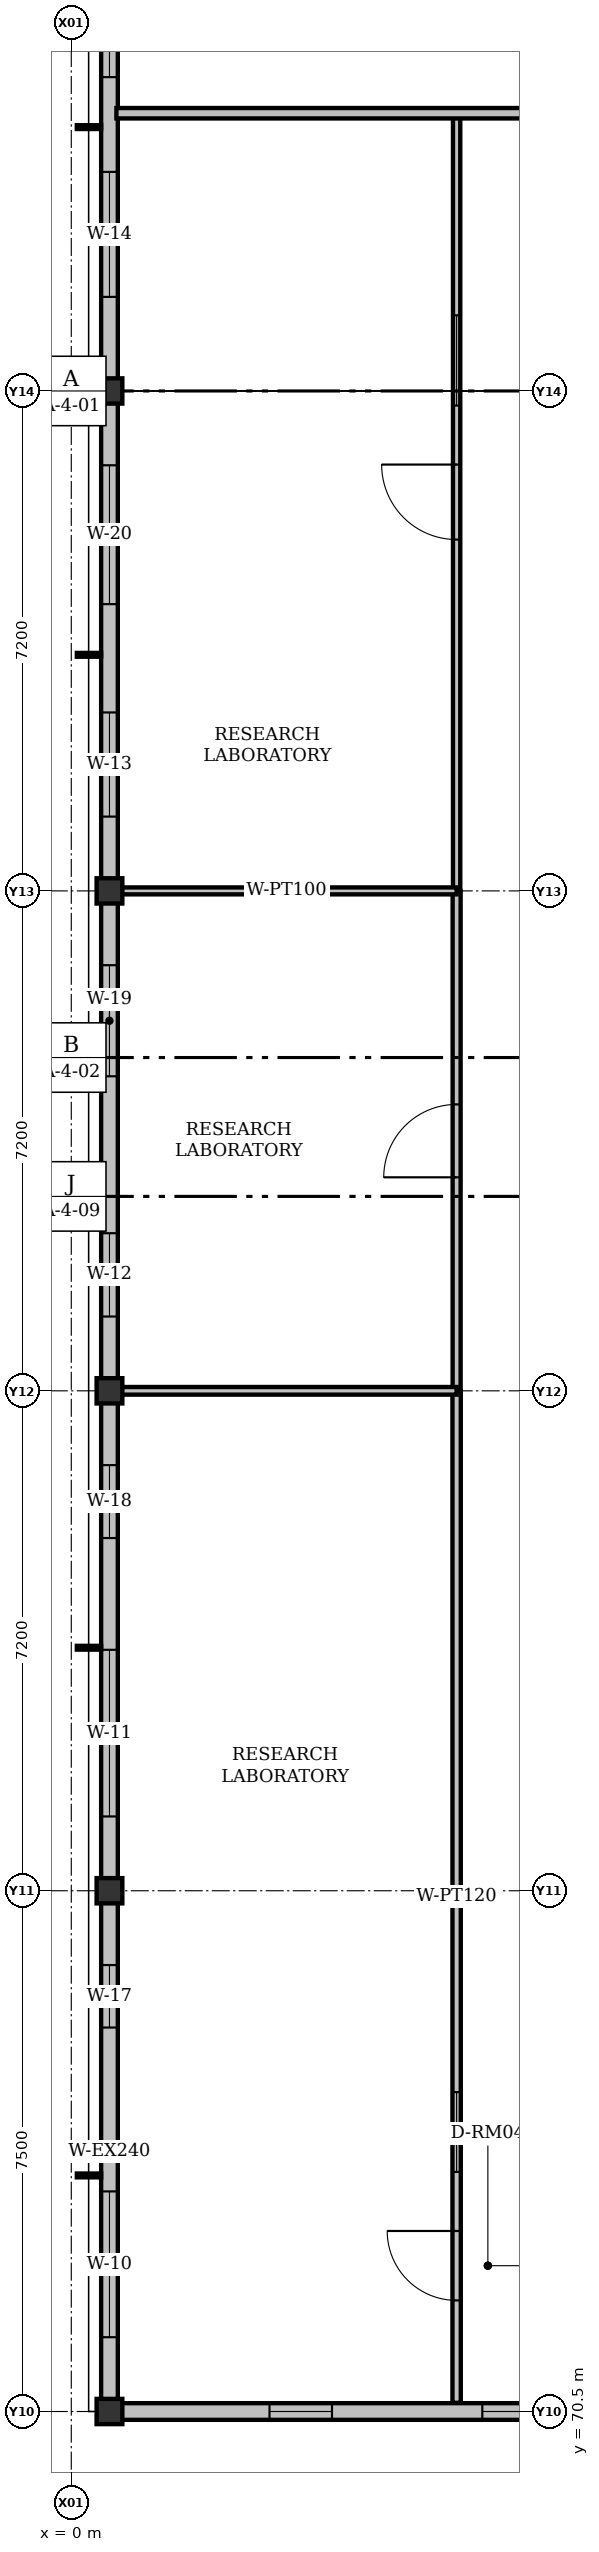
"""IFC4 building model, lengths in metres.
Left out: names, types, materials, properties, quantities, classifications, styles, units other than length and angle.
Written with IfcOpenShell. Run it as: python <this file> out.ifc"""

import sys

from ifc_helpers import new_model, si_unit, direction, frame, frame_2d, origin, origin_2d, place, context, subcontext, project, spatial, rectangle, i_section, extrude, element, fill, save


model = new_model("IFC4")
c1 = context("Model", 3, precision=1e-05, world=origin(), true_north=direction((0.0, 1.0)))
c2 = subcontext(c1, "Body", "Model", "MODEL_VIEW")
j1 = project(units=[si_unit("LENGTHUNIT", "METRE"), si_unit("PLANEANGLEUNIT", "RADIAN")], contexts=[c1])
p1 = place(None, origin())
s1 = spatial("IfcSite", under=j1, at=p1, CompositionType="ELEMENT")
p2 = place(p1, origin())
s2 = spatial("IfcBuilding", under=s1, at=p2, CompositionType="ELEMENT")
p3 = place(p2, frame((0.0, 0.0, 39.3)))
s3 = spatial("IfcBuildingStorey", under=s2, at=p3, CompositionType="ELEMENT", Elevation=39.3)
for number, where, z_axis, x_axis in (
    (1, (0.55, 70.5, 0.0), (0.0, 0.0, 1.0), (1.0, 0.0, 0.0)),
    (2, (0.55, 78.0, 0.0), (0.0, 0.0, 1.0), (1.0, 0.0, 0.0)),
    (3, (0.55, 85.2, 0.0), (0.0, 0.0, 1.0), (1.0, 0.0, 0.0)),
    (4, (0.55, 92.4, 0.0), (0.0, 0.0, 1.0), (1.0, 0.0, 0.0)),
    (5, (0.55, 99.6, 0.0), (0.0, 0.0, 1.0), (1.0, 0.0, 0.0)),
):
    element("IfcColumn", number, at=place(p3, frame(where, z_axis=z_axis, x_axis=x_axis)), inside=s3, PredefinedType="COLUMN", context=c2, shape_type="SweptSolid", body=[
        extrude(i_section(OverallWidth=0.371, OverallDepth=0.364, WebThickness=0.013, FlangeThickness=0.022, FilletRadius=0.015, at=origin_2d()), origin(), (0.0, 0.0, 1.0), 4.2),
    ])
p4 = place(p3, frame((0.55, 70.5, 0.0), z_axis=(0.0, 0.0, 1.0), x_axis=(0.0, 1.0, 0.0)))
e6 = element("IfcWall", 6, at=p4, inside=s3, PredefinedType="SOLIDWALL", context=c2, shape_type="SweptSolid", body=[
    extrude(rectangle(XDim=7.5, YDim=0.24, at=frame_2d((3.75, 0.0))), origin(), (0.0, 0.0, 1.0), 3.577),
])
p5 = place(p4, frame((1.07, 0.0, 0.92)))
e7 = element("IfcOpeningElement", 7, at=p5, cuts=e6, PredefinedType="OPENING", context=c2, shape_type="SweptSolid", body=[
    extrude(rectangle(XDim=2.1, YDim=1.55, at=frame_2d((1.05, 0.775))), frame((0.0, 0.12, 0.0), z_axis=(0.0, -1.0, 0.0), x_axis=(1.0, 0.0, 0.0)), (0.0, 0.0, 1.0), 0.24),
])
p6 = place(p4, frame((5.53, 0.0, 0.92)))
e8 = element("IfcOpeningElement", 8, at=p6, cuts=e6, PredefinedType="OPENING", context=c2, shape_type="SweptSolid", body=[
    extrude(rectangle(XDim=0.9, YDim=1.3, at=frame_2d((0.45, 0.65))), frame((0.0, 0.12, 0.0), z_axis=(0.0, -1.0, 0.0), x_axis=(1.0, 0.0, 0.0)), (0.0, 0.0, 1.0), 0.24),
])
p7 = place(p3, frame((0.55, 78.0, 0.0), z_axis=(0.0, 0.0, 1.0), x_axis=(0.0, 1.0, 0.0)))
e9 = element("IfcWall", 9, at=p7, inside=s3, PredefinedType="SOLIDWALL", context=c2, shape_type="SweptSolid", body=[
    extrude(rectangle(XDim=7.2, YDim=0.24, at=frame_2d((3.6, 0.0))), origin(), (0.0, 0.0, 1.0), 3.577),
])
p8 = place(p7, frame((1.07, 0.0, 0.92)))
e10 = element("IfcOpeningElement", 10, at=p8, cuts=e9, PredefinedType="OPENING", context=c2, shape_type="SweptSolid", body=[
    extrude(rectangle(XDim=2.4, YDim=1.55, at=frame_2d((1.2, 0.775))), frame((0.0, 0.12, 0.0), z_axis=(0.0, -1.0, 0.0), x_axis=(1.0, 0.0, 0.0)), (0.0, 0.0, 1.0), 0.24),
])
p9 = place(p7, frame((5.08, 0.0, 0.92)))
e11 = element("IfcOpeningElement", 11, at=p9, cuts=e9, PredefinedType="OPENING", context=c2, shape_type="SweptSolid", body=[
    extrude(rectangle(XDim=1.05, YDim=1.3, at=frame_2d((0.525, 0.65))), frame((0.0, 0.12, 0.0), z_axis=(0.0, -1.0, 0.0), x_axis=(1.0, 0.0, 0.0)), (0.0, 0.0, 1.0), 0.24),
])
p10 = place(p3, frame((0.55, 85.2, 0.0), z_axis=(0.0, 0.0, 1.0), x_axis=(0.0, 1.0, 0.0)))
e12 = element("IfcWall", 12, at=p10, inside=s3, PredefinedType="SOLIDWALL", context=c2, shape_type="SweptSolid", body=[
    extrude(rectangle(XDim=7.2, YDim=0.24, at=frame_2d((3.6, 0.0))), origin(), (0.0, 0.0, 1.0), 3.577),
])
p11 = place(p10, frame((1.07, 0.0, 0.92)))
e13 = element("IfcOpeningElement", 13, at=p11, cuts=e12, PredefinedType="OPENING", context=c2, shape_type="SweptSolid", body=[
    extrude(rectangle(XDim=1.2, YDim=1.7, at=frame_2d((0.6, 0.85))), frame((0.0, 0.12, 0.0), z_axis=(0.0, -1.0, 0.0), x_axis=(1.0, 0.0, 0.0)), (0.0, 0.0, 1.0), 0.24),
])
p12 = place(p10, frame((4.53, 0.0, 0.92)))
e14 = element("IfcOpeningElement", 14, at=p12, cuts=e12, PredefinedType="OPENING", context=c2, shape_type="SweptSolid", body=[
    extrude(rectangle(XDim=1.6, YDim=1.35, at=frame_2d((0.8, 0.675))), frame((0.0, 0.12, 0.0), z_axis=(0.0, -1.0, 0.0), x_axis=(1.0, 0.0, 0.0)), (0.0, 0.0, 1.0), 0.24),
])
p13 = place(p3, frame((0.55, 92.4, 0.0), z_axis=(0.0, 0.0, 1.0), x_axis=(0.0, 1.0, 0.0)))
e15 = element("IfcWall", 15, at=p13, inside=s3, PredefinedType="SOLIDWALL", context=c2, shape_type="SweptSolid", body=[
    extrude(rectangle(XDim=7.2, YDim=0.24, at=frame_2d((3.6, 0.0))), origin(), (0.0, 0.0, 1.0), 3.577),
])
p14 = place(p13, frame((1.07, 0.0, 0.92)))
e16 = element("IfcOpeningElement", 16, at=p14, cuts=e15, PredefinedType="OPENING", context=c2, shape_type="SweptSolid", body=[
    extrude(rectangle(XDim=1.5, YDim=1.7, at=frame_2d((0.75, 0.85))), frame((0.0, 0.12, 0.0), z_axis=(0.0, -1.0, 0.0), x_axis=(1.0, 0.0, 0.0)), (0.0, 0.0, 1.0), 0.24),
])
p15 = place(p13, frame((4.13, 0.0, 0.92)))
e17 = element("IfcOpeningElement", 17, at=p15, cuts=e15, PredefinedType="OPENING", context=c2, shape_type="SweptSolid", body=[
    extrude(rectangle(XDim=2.0, YDim=1.35, at=frame_2d((1.0, 0.675))), frame((0.0, 0.12, 0.0), z_axis=(0.0, -1.0, 0.0), x_axis=(1.0, 0.0, 0.0)), (0.0, 0.0, 1.0), 0.24),
])
p16 = place(p3, frame((0.55, 99.6, 0.0), z_axis=(0.0, 0.0, 1.0), x_axis=(0.0, 1.0, 0.0)))
e18 = element("IfcWall", 18, at=p16, inside=s3, PredefinedType="SOLIDWALL", context=c2, shape_type="SweptSolid", body=[
    extrude(rectangle(XDim=7.2, YDim=0.24, at=frame_2d((3.6, 0.0))), origin(), (0.0, 0.0, 1.0), 3.577),
])
p17 = place(p16, frame((1.355, 0.0, 0.92)))
e19 = element("IfcOpeningElement", 19, at=p17, cuts=e18, PredefinedType="OPENING", context=c2, shape_type="SweptSolid", body=[
    extrude(rectangle(XDim=1.8, YDim=1.7, at=frame_2d((0.9, 0.85))), frame((0.0, 0.12, 0.0), z_axis=(0.0, -1.0, 0.0), x_axis=(1.0, 0.0, 0.0)), (0.0, 0.0, 1.0), 0.24),
])
p18 = place(p16, frame((4.52, 0.0, 0.92)))
e20 = element("IfcOpeningElement", 20, at=p18, cuts=e18, PredefinedType="OPENING", context=c2, shape_type="SweptSolid", body=[
    extrude(rectangle(XDim=1.65, YDim=1.4, at=frame_2d((0.825, 0.7))), frame((0.0, 0.12, 0.0), z_axis=(0.0, -1.0, 0.0), x_axis=(1.0, 0.0, 0.0)), (0.0, 0.0, 1.0), 0.24),
])
p19 = place(p3, frame((7.85, 70.5, 0.0), z_axis=(0.0, 0.0, 1.0), x_axis=(-1.0, 0.0, 0.0)))
e21 = element("IfcWall", 21, at=p19, inside=s3, PredefinedType="SOLIDWALL", context=c2, shape_type="SweptSolid", body=[
    extrude(rectangle(XDim=7.3, YDim=0.24, at=frame_2d((3.65, 0.0))), origin(), (0.0, 0.0, 1.0), 3.577),
])
p20 = place(p19, frame((0.88, 0.0, 0.92)))
e22 = element("IfcOpeningElement", 22, at=p20, cuts=e21, PredefinedType="OPENING", context=c2, shape_type="SweptSolid", body=[
    extrude(rectangle(XDim=1.05, YDim=1.3, at=frame_2d((0.525, 0.65))), frame((0.0, 0.12, 0.0), z_axis=(0.0, -1.0, 0.0), x_axis=(1.0, 0.0, 0.0)), (0.0, 0.0, 1.0), 0.24),
])
p21 = place(p19, frame((4.095, 0.0, 0.92)))
e23 = element("IfcOpeningElement", 23, at=p21, cuts=e21, PredefinedType="OPENING", context=c2, shape_type="SweptSolid", body=[
    extrude(rectangle(XDim=0.9, YDim=1.3, at=frame_2d((0.45, 0.65))), frame((0.0, 0.12, 0.0), z_axis=(0.0, -1.0, 0.0), x_axis=(1.0, 0.0, 0.0)), (0.0, 0.0, 1.0), 0.24),
])
p22 = place(p3, frame((5.55, 70.625, 0.0), z_axis=(0.0, 0.0, 1.0), x_axis=(0.0, 1.0, 0.0)))
e24 = element("IfcWall", 24, at=p22, inside=s3, PredefinedType="PARTITIONING", context=c2, shape_type="SweptSolid", body=[
    extrude(rectangle(XDim=14.575, YDim=0.12, at=frame_2d((7.288, 0.0))), origin(), (0.0, 0.0, 1.0), 3.451),
])
p23 = place(p22, frame((1.475, 0.0, 0.0)))
e25 = element("IfcOpeningElement", 25, at=p23, cuts=e24, PredefinedType="OPENING", context=c2, shape_type="SweptSolid", body=[
    extrude(rectangle(XDim=1.0, YDim=2.1, at=frame_2d((0.5, 1.05))), frame((0.0, 0.06, 0.0), z_axis=(0.0, -1.0, 0.0), x_axis=(1.0, 0.0, 0.0)), (0.0, 0.0, 1.0), 0.12),
])
p24 = place(p22, frame((3.325, 0.0, 0.92)))
e26 = element("IfcOpeningElement", 26, at=p24, cuts=e24, PredefinedType="OPENING", context=c2, shape_type="SweptSolid", body=[
    extrude(rectangle(XDim=1.15, YDim=1.3, at=frame_2d((0.575, 0.65))), frame((0.0, 0.06, 0.0), z_axis=(0.0, -1.0, 0.0), x_axis=(1.0, 0.0, 0.0)), (0.0, 0.0, 1.0), 0.12),
])
p25 = place(p3, frame((5.55, 85.2, 0.0), z_axis=(0.0, 0.0, 1.0), x_axis=(0.0, 1.0, 0.0)))
e27 = element("IfcWall", 27, at=p25, inside=s3, PredefinedType="PARTITIONING", context=c2, shape_type="SweptSolid", body=[
    extrude(rectangle(XDim=7.2, YDim=0.115, at=frame_2d((3.6, 0.0))), origin(), (0.0, 0.0, 1.0), 3.451),
])
p26 = place(p25, frame((3.075, 0.0, 0.0)))
e28 = element("IfcOpeningElement", 28, at=p26, cuts=e27, PredefinedType="OPENING", context=c2, shape_type="SweptSolid", body=[
    extrude(rectangle(XDim=1.05, YDim=2.1, at=frame_2d((0.525, 1.05))), frame((0.0, 0.058, 0.0), z_axis=(0.0, -1.0, 0.0), x_axis=(1.0, 0.0, 0.0)), (0.0, 0.0, 1.0), 0.115),
])
p27 = place(p3, frame((0.65, 85.2, 0.0), z_axis=(0.0, 0.0, 1.0), x_axis=(1.0, 0.0, 0.0)))
e29 = element("IfcWall", 29, at=p27, inside=s3, PredefinedType="PARTITIONING", context=c2, shape_type="SweptSolid", body=[
    extrude(rectangle(XDim=4.9, YDim=0.11, at=frame_2d((2.45, 0.0))), origin(), (0.0, 0.0, 1.0), 3.451),
])
p28 = place(p3, frame((5.55, 92.4, 0.0), z_axis=(0.0, 0.0, 1.0), x_axis=(0.0, 1.0, 0.0)))
e30 = element("IfcWall", 30, at=p28, inside=s3, PredefinedType="PARTITIONING", context=c2, shape_type="SweptSolid", body=[
    extrude(rectangle(XDim=11.2, YDim=0.105, at=frame_2d((5.6, 0.0))), origin(), (0.0, 0.0, 1.0), 3.451),
])
p29 = place(p28, frame((5.06, 0.0, 0.0)))
e31 = element("IfcOpeningElement", 31, at=p29, cuts=e30, PredefinedType="OPENING", context=c2, shape_type="SweptSolid", body=[
    extrude(rectangle(XDim=1.08, YDim=2.1, at=frame_2d((0.54, 1.05))), frame((0.0, 0.052, 0.0), z_axis=(0.0, -1.0, 0.0), x_axis=(1.0, 0.0, 0.0)), (0.0, 0.0, 1.0), 0.105),
])
p30 = place(p28, frame((6.99, 0.0, 0.92)))
e32 = element("IfcOpeningElement", 32, at=p30, cuts=e30, PredefinedType="OPENING", context=c2, shape_type="SweptSolid", body=[
    extrude(rectangle(XDim=1.3, YDim=1.3, at=frame_2d((0.65, 0.65))), frame((0.0, 0.052, 0.0), z_axis=(0.0, -1.0, 0.0), x_axis=(1.0, 0.0, 0.0)), (0.0, 0.0, 1.0), 0.105),
])
p31 = place(p3, frame((0.65, 92.4, 0.0), z_axis=(0.0, 0.0, 1.0), x_axis=(1.0, 0.0, 0.0)))
e33 = element("IfcWall", 33, at=p31, inside=s3, PredefinedType="PARTITIONING", context=c2, shape_type="SweptSolid", body=[
    extrude(rectangle(XDim=4.9, YDim=0.1, at=frame_2d((2.45, 0.0))), origin(), (0.0, 0.0, 1.0), 3.451),
])
p32 = place(p3, frame((0.65, 103.6, 0.0), z_axis=(0.0, 0.0, 1.0), x_axis=(1.0, 0.0, 0.0)))
e34 = element("IfcWall", 34, at=p32, inside=s3, PredefinedType="PARTITIONING", context=c2, shape_type="SweptSolid", body=[
    extrude(rectangle(XDim=25.515, YDim=0.15, at=frame_2d((12.758, 0.0))), origin(), (0.0, 0.0, 1.0), 3.527),
])
p33 = place(p32, frame((9.49, 0.0, 0.0)))
e35 = element("IfcOpeningElement", 35, at=p33, cuts=e34, PredefinedType="OPENING", context=c2, shape_type="SweptSolid", body=[
    extrude(rectangle(XDim=0.92, YDim=2.15, at=frame_2d((0.46, 1.075))), frame((0.0, 0.075, 0.0), z_axis=(0.0, -1.0, 0.0), x_axis=(1.0, 0.0, 0.0)), (0.0, 0.0, 1.0), 0.15),
])
p34 = place(p32, frame((11.26, 0.0, 0.92)))
e36 = element("IfcOpeningElement", 36, at=p34, cuts=e34, PredefinedType="OPENING", context=c2, shape_type="SweptSolid", body=[
    extrude(rectangle(XDim=1.45, YDim=1.3, at=frame_2d((0.725, 0.65))), frame((0.0, 0.075, 0.0), z_axis=(0.0, -1.0, 0.0), x_axis=(1.0, 0.0, 0.0)), (0.0, 0.0, 1.0), 0.15),
])
p35 = place(p5, origin())
e37 = element("IfcWindow", 37, at=p35, inside=s3, PartitioningType="DOUBLE_PANEL_VERTICAL", PredefinedType="WINDOW", context=c2, shape_type="SweptSolid", body=[
    extrude(rectangle(XDim=2.1, YDim=1.55, at=frame_2d((1.05, 0.775))), frame((0.0, 0.03, 0.0), z_axis=(0.0, -1.0, 0.0), x_axis=(1.0, 0.0, 0.0)), (0.0, 0.0, 1.0), 0.06),
])
fill(e7, e37)
p36 = place(p6, origin())
e38 = element("IfcWindow", 38, at=p36, inside=s3, PartitioningType="SINGLE_PANEL", PredefinedType="WINDOW", context=c2, shape_type="SweptSolid", body=[
    extrude(rectangle(XDim=0.9, YDim=1.3, at=frame_2d((0.45, 0.65))), frame((0.0, 0.03, 0.0), z_axis=(0.0, -1.0, 0.0), x_axis=(1.0, 0.0, 0.0)), (0.0, 0.0, 1.0), 0.06),
])
fill(e8, e38)
p37 = place(p8, origin())
e39 = element("IfcWindow", 39, at=p37, inside=s3, PartitioningType="DOUBLE_PANEL_VERTICAL", PredefinedType="WINDOW", context=c2, shape_type="SweptSolid", body=[
    extrude(rectangle(XDim=2.4, YDim=1.55, at=frame_2d((1.2, 0.775))), frame((0.0, 0.03, 0.0), z_axis=(0.0, -1.0, 0.0), x_axis=(1.0, 0.0, 0.0)), (0.0, 0.0, 1.0), 0.06),
])
fill(e10, e39)
p38 = place(p9, origin())
e40 = element("IfcWindow", 40, at=p38, inside=s3, PartitioningType="SINGLE_PANEL", PredefinedType="WINDOW", context=c2, shape_type="SweptSolid", body=[
    extrude(rectangle(XDim=1.05, YDim=1.3, at=frame_2d((0.525, 0.65))), frame((0.0, 0.03, 0.0), z_axis=(0.0, -1.0, 0.0), x_axis=(1.0, 0.0, 0.0)), (0.0, 0.0, 1.0), 0.06),
])
fill(e11, e40)
p39 = place(p11, origin())
e41 = element("IfcWindow", 41, at=p39, inside=s3, PartitioningType="SINGLE_PANEL", PredefinedType="WINDOW", context=c2, shape_type="SweptSolid", body=[
    extrude(rectangle(XDim=1.2, YDim=1.7, at=frame_2d((0.6, 0.85))), frame((0.0, 0.03, 0.0), z_axis=(0.0, -1.0, 0.0), x_axis=(1.0, 0.0, 0.0)), (0.0, 0.0, 1.0), 0.06),
])
fill(e13, e41)
p40 = place(p12, origin())
e42 = element("IfcWindow", 42, at=p40, inside=s3, PartitioningType="DOUBLE_PANEL_VERTICAL", PredefinedType="WINDOW", context=c2, shape_type="SweptSolid", body=[
    extrude(rectangle(XDim=1.6, YDim=1.35, at=frame_2d((0.8, 0.675))), frame((0.0, 0.03, 0.0), z_axis=(0.0, -1.0, 0.0), x_axis=(1.0, 0.0, 0.0)), (0.0, 0.0, 1.0), 0.06),
])
fill(e14, e42)
p41 = place(p14, origin())
e43 = element("IfcWindow", 43, at=p41, inside=s3, PartitioningType="SINGLE_PANEL", PredefinedType="WINDOW", context=c2, shape_type="SweptSolid", body=[
    extrude(rectangle(XDim=1.5, YDim=1.7, at=frame_2d((0.75, 0.85))), frame((0.0, 0.03, 0.0), z_axis=(0.0, -1.0, 0.0), x_axis=(1.0, 0.0, 0.0)), (0.0, 0.0, 1.0), 0.06),
])
fill(e16, e43)
p42 = place(p15, origin())
e44 = element("IfcWindow", 44, at=p42, inside=s3, PartitioningType="DOUBLE_PANEL_VERTICAL", PredefinedType="WINDOW", context=c2, shape_type="SweptSolid", body=[
    extrude(rectangle(XDim=2.0, YDim=1.35, at=frame_2d((1.0, 0.675))), frame((0.0, 0.03, 0.0), z_axis=(0.0, -1.0, 0.0), x_axis=(1.0, 0.0, 0.0)), (0.0, 0.0, 1.0), 0.06),
])
fill(e17, e44)
p43 = place(p17, origin())
e45 = element("IfcWindow", 45, at=p43, inside=s3, PartitioningType="DOUBLE_PANEL_VERTICAL", PredefinedType="WINDOW", context=c2, shape_type="SweptSolid", body=[
    extrude(rectangle(XDim=1.8, YDim=1.7, at=frame_2d((0.9, 0.85))), frame((0.0, 0.03, 0.0), z_axis=(0.0, -1.0, 0.0), x_axis=(1.0, 0.0, 0.0)), (0.0, 0.0, 1.0), 0.06),
])
fill(e19, e45)
p44 = place(p18, origin())
e46 = element("IfcWindow", 46, at=p44, inside=s3, PartitioningType="DOUBLE_PANEL_VERTICAL", PredefinedType="WINDOW", context=c2, shape_type="SweptSolid", body=[
    extrude(rectangle(XDim=1.65, YDim=1.4, at=frame_2d((0.825, 0.7))), frame((0.0, 0.03, 0.0), z_axis=(0.0, -1.0, 0.0), x_axis=(1.0, 0.0, 0.0)), (0.0, 0.0, 1.0), 0.06),
])
fill(e20, e46)
p45 = place(p20, origin())
e47 = element("IfcWindow", 47, at=p45, inside=s3, PartitioningType="SINGLE_PANEL", PredefinedType="WINDOW", context=c2, shape_type="SweptSolid", body=[
    extrude(rectangle(XDim=1.05, YDim=1.3, at=frame_2d((0.525, 0.65))), frame((0.0, 0.03, 0.0), z_axis=(0.0, -1.0, 0.0), x_axis=(1.0, 0.0, 0.0)), (0.0, 0.0, 1.0), 0.06),
])
fill(e22, e47)
p46 = place(p21, origin())
e48 = element("IfcWindow", 48, at=p46, inside=s3, PartitioningType="SINGLE_PANEL", PredefinedType="WINDOW", context=c2, shape_type="SweptSolid", body=[
    extrude(rectangle(XDim=0.9, YDim=1.3, at=frame_2d((0.45, 0.65))), frame((0.0, 0.03, 0.0), z_axis=(0.0, -1.0, 0.0), x_axis=(1.0, 0.0, 0.0)), (0.0, 0.0, 1.0), 0.06),
])
fill(e23, e48)
p47 = place(p23, origin())
e49 = element("IfcDoor", 49, at=p47, inside=s3, OperationType="SINGLE_SWING_RIGHT", PredefinedType="DOOR", context=c2, shape_type="SweptSolid", body=[
    extrude(rectangle(XDim=1.0, YDim=2.1, at=frame_2d((0.5, 1.05))), frame((0.0, 0.025, 0.0), z_axis=(0.0, -1.0, 0.0), x_axis=(1.0, 0.0, 0.0)), (0.0, 0.0, 1.0), 0.05),
])
fill(e25, e49)
p48 = place(p24, origin())
e50 = element("IfcWindow", 50, at=p48, inside=s3, PartitioningType="SINGLE_PANEL", PredefinedType="WINDOW", context=c2, shape_type="SweptSolid", body=[
    extrude(rectangle(XDim=1.15, YDim=1.3, at=frame_2d((0.575, 0.65))), frame((0.0, 0.03, 0.0), z_axis=(0.0, -1.0, 0.0), x_axis=(1.0, 0.0, 0.0)), (0.0, 0.0, 1.0), 0.06),
])
fill(e26, e50)
p49 = place(p26, origin())
e51 = element("IfcDoor", 51, at=p49, inside=s3, OperationType="SINGLE_SWING_LEFT", PredefinedType="DOOR", context=c2, shape_type="SweptSolid", body=[
    extrude(rectangle(XDim=1.05, YDim=2.1, at=frame_2d((0.525, 1.05))), frame((0.0, 0.025, 0.0), z_axis=(0.0, -1.0, 0.0), x_axis=(1.0, 0.0, 0.0)), (0.0, 0.0, 1.0), 0.05),
])
fill(e28, e51)
p50 = place(p29, origin())
e52 = element("IfcDoor", 52, at=p50, inside=s3, OperationType="SINGLE_SWING_RIGHT", PredefinedType="DOOR", context=c2, shape_type="SweptSolid", body=[
    extrude(rectangle(XDim=1.08, YDim=2.1, at=frame_2d((0.54, 1.05))), frame((0.0, 0.025, 0.0), z_axis=(0.0, -1.0, 0.0), x_axis=(1.0, 0.0, 0.0)), (0.0, 0.0, 1.0), 0.05),
])
fill(e31, e52)
p51 = place(p30, origin())
e53 = element("IfcWindow", 53, at=p51, inside=s3, PartitioningType="SINGLE_PANEL", PredefinedType="WINDOW", context=c2, shape_type="SweptSolid", body=[
    extrude(rectangle(XDim=1.3, YDim=1.3, at=frame_2d((0.65, 0.65))), frame((0.0, 0.03, 0.0), z_axis=(0.0, -1.0, 0.0), x_axis=(1.0, 0.0, 0.0)), (0.0, 0.0, 1.0), 0.06),
])
fill(e32, e53)
save(model, sys.argv[1])
